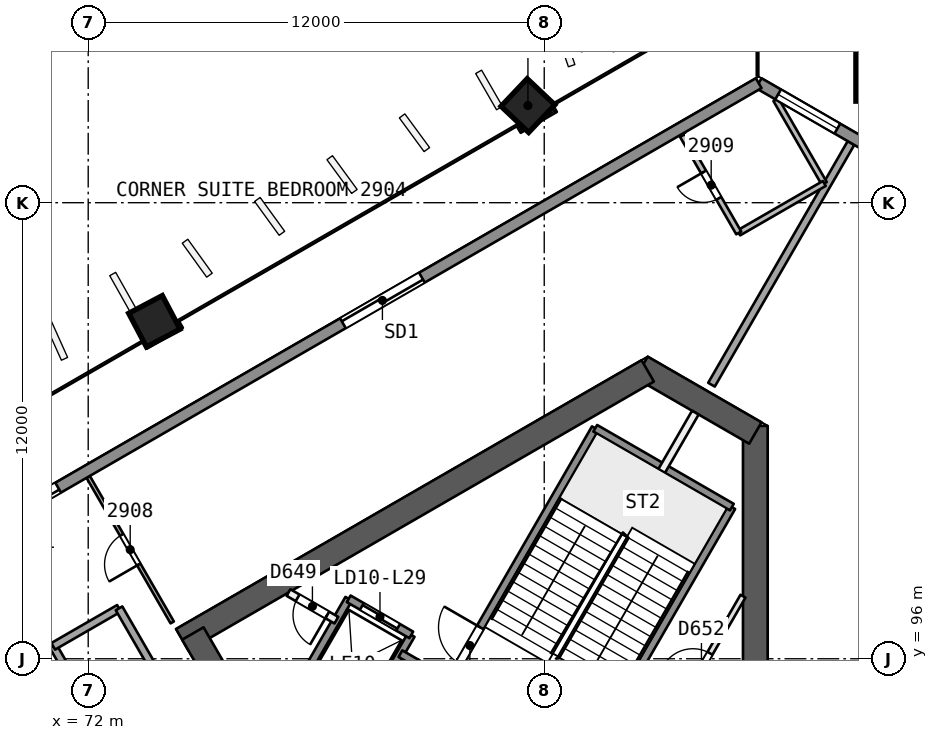
"""IFC4 building model, lengths in metres.
Left out: names, types, materials, properties, quantities, classifications, styles, units other than length and angle.
Written with IfcOpenShell. Run it as: python <this file> out.ifc"""

import sys

from ifc_helpers import new_model, si_unit, direction, frame, frame_2d, origin, origin_2d, place, context, subcontext, project, spatial, rectangle, extrude, element, fill, save


model = new_model("IFC4")
c1 = context("Model", 3, precision=1e-05, world=origin(), true_north=direction((0.0, 1.0)))
c2 = subcontext(c1, "Body", "Model", "MODEL_VIEW")
j1 = project(units=[si_unit("LENGTHUNIT", "METRE"), si_unit("PLANEANGLEUNIT", "RADIAN")], contexts=[c1])
p1 = place(None, origin())
s1 = spatial("IfcSite", under=j1, at=p1, CompositionType="ELEMENT")
p2 = place(p1, origin())
s2 = spatial("IfcBuilding", under=s1, at=p2, CompositionType="ELEMENT")
p3 = place(p2, frame((0.0, 0.0, 121.6)))
s3 = spatial("IfcBuildingStorey", under=s2, at=p3, CompositionType="ELEMENT", Elevation=121.6)
p4 = place(p3, frame((89.555, 88.119, 0.0), z_axis=(0.0, 0.0, 1.0), x_axis=(0.0, 1.0, 0.0)))
e1 = element("IfcWall", 1, at=p4, inside=s3, PredefinedType="SHEAR", context=c2, shape_type="SweptSolid", body=[
    extrude(rectangle(XDim=14.009, YDim=0.65, at=frame_2d((7.004, 0.0))), origin(), (0.0, 0.0, 1.0), 3.7),
])
p5 = place(p3, frame((89.555, 101.94, 0.0), z_axis=(0.0, 0.0, 1.0), x_axis=(-0.866031550877, 0.499989352773, 0.0)))
e2 = element("IfcWall", 2, at=p5, inside=s3, PredefinedType="SHEAR", context=c2, shape_type="SweptSolid", body=[
    extrude(rectangle(XDim=3.458, YDim=0.65, at=frame_2d((1.729, 0.0))), origin(), (0.0, 0.0, 1.0), 3.7),
])
p6 = place(p3, frame((86.723, 103.575, 0.0), z_axis=(0.0, 0.0, 1.0), x_axis=(-0.866031824457, -0.499988878904, 0.0)))
e3 = element("IfcWall", 3, at=p6, inside=s3, PredefinedType="SHEAR", context=c2, shape_type="SweptSolid", body=[
    extrude(rectangle(XDim=14.146, YDim=0.65, at=frame_2d((7.073, 0.0))), origin(), (0.0, 0.0, 1.0), 3.7),
])
p7 = place(p3, frame((74.754, 96.665, 0.0), z_axis=(0.0, 0.0, 1.0), x_axis=(0.500011799426, -0.866018591275, 0.0)))
e4 = element("IfcWall", 4, at=p7, inside=s3, PredefinedType="SHEAR", context=c2, shape_type="SweptSolid", body=[
    extrude(rectangle(XDim=10.055, YDim=0.65, at=frame_2d((5.027, 0.0))), origin(), (0.0, 0.0, 1.0), 3.7),
])
p8 = place(p7, frame((7.905, 0.0, 0.0)))
e5 = element("IfcOpeningElement", 5, at=p8, cuts=e4, PredefinedType="OPENING", context=c2, shape_type="SweptSolid", body=[
    extrude(rectangle(XDim=1.2, YDim=2.1, at=frame_2d((0.6, 1.05))), frame((0.0, 0.335, 0.0), z_axis=(0.0, -1.0, 0.0), x_axis=(1.0, 0.0, 0.0)), (0.0, 0.0, 1.0), 0.671),
])
p9 = place(p3, frame((93.422, 111.908, 0.0), z_axis=(-0.017607001884, -0.030531992032, 0.999378702468), x_axis=(0.499253360369, 0.865738917404, 0.035244986208)))
e6 = element("IfcColumn", 6, at=p9, inside=s3, PredefinedType="COLUMN", context=c2, shape_type="SweptSolid", body=[
    extrude(rectangle(XDim=2.4, YDim=2.4, at=origin_2d()), origin(), (0.0, 0.0, 1.0), 3.702),
])
p10 = place(p3, frame((83.581, 110.59, 0.0), z_axis=(-0.008376454378, -0.028163354484, 0.999568237028), x_axis=(0.865847772055, 0.49985224108, 0.021339463807)))
e7 = element("IfcColumn", 7, at=p10, inside=s3, PredefinedType="COLUMN", context=c2, shape_type="SweptSolid", body=[
    extrude(rectangle(XDim=1.0, YDim=1.0, at=origin_2d()), origin(), (0.0, 0.0, 1.0), 3.702),
])
p11 = place(p3, frame((73.74, 104.908, 0.0), z_axis=(0.000857578916, -0.022824792675, 0.999739112668), x_axis=(0.866060219769, 0.499825848733, 0.01066848966)))
e8 = element("IfcColumn", 8, at=p11, inside=s3, PredefinedType="COLUMN", context=c2, shape_type="SweptSolid", body=[
    extrude(rectangle(XDim=1.0, YDim=1.0, at=origin_2d()), origin(), (0.0, 0.0, 1.0), 3.701),
])
p12 = place(p3, frame((92.073, 109.571, 0.0), z_axis=(0.0, 0.0, 1.0), x_axis=(-0.49997955719, -0.866037206124, 0.0)))
e9 = element("IfcWall", 9, at=p12, inside=s3, PredefinedType="PARTITIONING", context=c2, shape_type="SweptSolid", body=[
    extrude(rectangle(XDim=7.343, YDim=0.2, at=frame_2d((3.671, 0.0))), origin(), (0.0, 0.0, 1.0), 3.25),
])
p13 = place(p3, frame((74.21, 96.956, 0.0), z_axis=(0.0, 0.0, 1.0), x_axis=(-0.499956595832, 0.866050461743, 0.0)))
e10 = element("IfcWall", 10, at=p13, inside=s3, PredefinedType="PARTITIONING", context=c2, shape_type="SweptSolid", body=[
    extrude(rectangle(XDim=4.423, YDim=0.1, at=frame_2d((2.211, 0.0))), origin(), (0.0, 0.0, 1.0), 3.25),
])
p14 = place(p13, frame((1.761, 0.0, 0.0)))
e11 = element("IfcOpeningElement", 11, at=p14, cuts=e10, PredefinedType="OPENING", context=c2, shape_type="SweptSolid", body=[
    extrude(rectangle(XDim=0.9, YDim=2.1, at=frame_2d((0.45, 1.05))), frame((0.0, 0.061, 0.0), z_axis=(0.0, -1.0, 0.0), x_axis=(1.0, 0.0, 0.0)), (0.0, 0.0, 1.0), 0.121),
])
p15 = place(p3, frame((75.579, 88.533, 0.0), z_axis=(0.0, 0.0, 1.0), x_axis=(-0.5000018851, 0.866024315419, 0.0)))
e12 = element("IfcWall", 12, at=p15, inside=s3, PredefinedType="PARTITIONING", context=c2, shape_type="SweptSolid", body=[
    extrude(rectangle(XDim=9.0, YDim=0.2, at=frame_2d((4.5, 0.0))), origin(), (0.0, 0.0, 1.0), 3.25),
])
p16 = place(p15, frame((2.1, 0.0, 0.0)))
e13 = element("IfcOpeningElement", 13, at=p16, cuts=e12, PredefinedType="OPENING", context=c2, shape_type="SweptSolid", body=[
    extrude(rectangle(XDim=0.9, YDim=2.1, at=frame_2d((0.45, 1.05))), frame((0.0, 0.11, 0.0), z_axis=(0.0, -1.0, 0.0), x_axis=(1.0, 0.0, 0.0)), (0.0, 0.0, 1.0), 0.221),
])
p17 = place(p3, frame((71.079, 96.327, 0.0), z_axis=(0.0, 0.0, 1.0), x_axis=(0.866041268327, 0.499972520799, 0.0)))
e14 = element("IfcWall", 14, at=p17, inside=s3, PredefinedType="PARTITIONING", context=c2, shape_type="SweptSolid", body=[
    extrude(rectangle(XDim=2.0, YDim=0.2, at=frame_2d((1.0, 0.0))), origin(), (0.0, 0.0, 1.0), 3.25),
])
p18 = place(p3, frame((72.811, 97.327, 0.0), z_axis=(0.0, 0.0, 1.0), x_axis=(0.5000018851, -0.866024315419, 0.0)))
e15 = element("IfcWall", 15, at=p18, inside=s3, PredefinedType="PARTITIONING", context=c2, shape_type="SweptSolid", body=[
    extrude(rectangle(XDim=9.0, YDim=0.2, at=frame_2d((4.5, 0.0))), origin(), (0.0, 0.0, 1.0), 3.25),
])
p19 = place(p3, frame((68.489, 98.76, 0.0), z_axis=(0.0, 0.0, 1.0), x_axis=(0.499987701298, -0.866032504327, 0.0)))
e16 = element("IfcWall", 16, at=p19, inside=s3, PredefinedType="PARTITIONING", context=c2, shape_type="SweptSolid", body=[
    extrude(rectangle(XDim=9.402, YDim=0.2, at=frame_2d((4.701, 0.0))), origin(), (0.0, 0.0, 1.0), 3.25),
])
p20 = place(p3, frame((90.096, 110.712, 0.0), z_axis=(0.0, 0.0, 1.0), x_axis=(0.499963028251, -0.866046748381, 0.0)))
e17 = element("IfcWall", 17, at=p20, inside=s3, PredefinedType="PARTITIONING", context=c2, shape_type="SweptSolid", body=[
    extrude(rectangle(XDim=2.548, YDim=0.15, at=frame_2d((1.274, 0.0))), origin(), (0.0, 0.0, 1.0), 3.25),
])
p21 = place(p3, frame((91.37, 108.505, 0.0), z_axis=(0.0, 0.0, 1.0), x_axis=(-0.866062058628, -0.499936506574, 0.0)))
e18 = element("IfcWall", 18, at=p21, inside=s3, PredefinedType="PARTITIONING", context=c2, shape_type="SweptSolid", body=[
    extrude(rectangle(XDim=2.6, YDim=0.15, at=frame_2d((1.3, 0.0))), origin(), (0.0, 0.0, 1.0), 3.25),
])
p22 = place(p3, frame((89.118, 107.206, 0.0), z_axis=(0.0, 0.0, 1.0), x_axis=(-0.500008142102, 0.866020702889, 0.0)))
e19 = element("IfcWall", 19, at=p22, inside=s3, PredefinedType="PARTITIONING", context=c2, shape_type="SweptSolid", body=[
    extrude(rectangle(XDim=2.959, YDim=0.15, at=frame_2d((1.479, 0.0))), origin(), (0.0, 0.0, 1.0), 3.25),
])
p23 = place(p22, frame((1.05, 0.0, 0.0)))
e20 = element("IfcOpeningElement", 20, at=p23, cuts=e19, PredefinedType="OPENING", context=c2, shape_type="SweptSolid", body=[
    extrude(rectangle(XDim=0.8, YDim=2.1, at=frame_2d((0.4, 1.05))), frame((0.0, 0.085, 0.0), z_axis=(0.0, -1.0, 0.0), x_axis=(1.0, 0.0, 0.0)), (0.0, 0.0, 1.0), 0.171),
])
p24 = place(p3, frame((89.643, 111.145, 0.0), z_axis=(0.0, 0.0, 1.0), x_axis=(0.866033704959, -0.499985621668, 0.0)))
e21 = element("IfcWall", 21, at=p24, inside=s3, PredefinedType="SOLIDWALL", context=c2, shape_type="SweptSolid", body=[
    extrude(rectangle(XDim=5.782, YDim=0.3, at=frame_2d((2.891, 0.0))), origin(), (0.0, 0.0, 1.0), 3.25),
])
p25 = place(p24, frame((0.59, 0.0, 0.9)))
e22 = element("IfcOpeningElement", 22, at=p25, cuts=e21, PredefinedType="OPENING", context=c2, shape_type="SweptSolid", body=[
    extrude(rectangle(XDim=1.8, YDim=1.5, at=frame_2d((0.9, 0.75))), frame((0.0, 0.161, 0.0), z_axis=(0.0, -1.0, 0.0), x_axis=(1.0, 0.0, 0.0)), (0.0, 0.0, 1.0), 0.321),
])
p26 = place(p24, frame((3.479, 0.0, 0.9)))
e23 = element("IfcOpeningElement", 23, at=p26, cuts=e21, PredefinedType="OPENING", context=c2, shape_type="SweptSolid", body=[
    extrude(rectangle(XDim=1.8, YDim=1.5, at=frame_2d((0.9, 0.75))), frame((0.0, 0.161, 0.0), z_axis=(0.0, -1.0, 0.0), x_axis=(1.0, 0.0, 0.0)), (0.0, 0.0, 1.0), 0.321),
])
p27 = place(p3, frame((40.706, 82.891, 0.0), z_axis=(0.0, 0.0, 1.0), x_axis=(0.866024855185, 0.5000009502, 0.0)))
e24 = element("IfcWall", 24, at=p27, inside=s3, PredefinedType="SOLIDWALL", context=c2, shape_type="SweptSolid", body=[
    extrude(rectangle(XDim=56.508, YDim=0.3, at=frame_2d((28.254, 0.0))), origin(), (0.0, 0.0, 1.0), 3.25),
])
p28 = place(p27, frame((27.054, 0.0, 0.0)))
e25 = element("IfcOpeningElement", 25, at=p28, cuts=e24, PredefinedType="OPENING", context=c2, shape_type="SweptSolid", body=[
    extrude(rectangle(XDim=2.4, YDim=2.4, at=frame_2d((1.2, 1.2))), frame((0.0, 0.161, 0.0), z_axis=(0.0, -1.0, 0.0), x_axis=(1.0, 0.0, 0.0)), (0.0, 0.0, 1.0), 0.321),
])
p29 = place(p27, frame((32.822, 0.0, 0.0)))
e26 = element("IfcOpeningElement", 26, at=p29, cuts=e24, PredefinedType="OPENING", context=c2, shape_type="SweptSolid", body=[
    extrude(rectangle(XDim=2.4, YDim=2.4, at=frame_2d((1.2, 1.2))), frame((0.0, 0.161, 0.0), z_axis=(0.0, -1.0, 0.0), x_axis=(1.0, 0.0, 0.0)), (0.0, 0.0, 1.0), 0.321),
])
p30 = place(p27, frame((43.875, 0.0, 0.0)))
e27 = element("IfcOpeningElement", 27, at=p30, cuts=e24, PredefinedType="OPENING", context=c2, shape_type="SweptSolid", body=[
    extrude(rectangle(XDim=2.4, YDim=2.4, at=frame_2d((1.2, 1.2))), frame((0.0, 0.161, 0.0), z_axis=(0.0, -1.0, 0.0), x_axis=(1.0, 0.0, 0.0)), (0.0, 0.0, 1.0), 0.321),
])
p31 = place(p27, frame((21.286, 0.0, 0.0)))
e28 = element("IfcOpeningElement", 28, at=p31, cuts=e24, PredefinedType="OPENING", context=c2, shape_type="SweptSolid", body=[
    extrude(rectangle(XDim=2.4, YDim=2.4, at=frame_2d((1.2, 1.2))), frame((0.0, 0.161, 0.0), z_axis=(0.0, -1.0, 0.0), x_axis=(1.0, 0.0, 0.0)), (0.0, 0.0, 1.0), 0.321),
])
p32 = place(p27, frame((10.251, 0.0, 0.0)))
e29 = element("IfcOpeningElement", 29, at=p32, cuts=e24, PredefinedType="OPENING", context=c2, shape_type="SweptSolid", body=[
    extrude(rectangle(XDim=2.4, YDim=2.4, at=frame_2d((1.2, 1.2))), frame((0.0, 0.161, 0.0), z_axis=(0.0, -1.0, 0.0), x_axis=(1.0, 0.0, 0.0)), (0.0, 0.0, 1.0), 0.321),
])
p33 = place(p3, frame((87.071, 93.908, 0.0), z_axis=(0.0, 0.0, 1.0), x_axis=(0.500012861172, 0.866017978256, 0.0)))
e30 = element("IfcWall", 30, at=p33, inside=s3, PredefinedType="PARTITIONING", context=c2, shape_type="SweptSolid", body=[
    extrude(rectangle(XDim=4.318, YDim=0.15, at=frame_2d((2.159, 0.0))), origin(), (0.0, 0.0, 1.0), 3.25),
])
p34 = place(p33, frame((1.681, 0.0, 0.0)))
e31 = element("IfcOpeningElement", 31, at=p34, cuts=e30, PredefinedType="OPENING", context=c2, shape_type="SweptSolid", body=[
    extrude(rectangle(XDim=0.9, YDim=2.1, at=frame_2d((0.45, 1.05))), frame((0.0, 0.085, 0.0), z_axis=(0.0, -1.0, 0.0), x_axis=(1.0, 0.0, 0.0)), (0.0, 0.0, 1.0), 0.171),
])
p35 = place(p3, frame((85.087, 93.321, 0.0), z_axis=(0.0, 0.0, 1.0), x_axis=(0.500019787375, 0.866013979237, 0.0)))
e32 = element("IfcWall", 32, at=p35, inside=s3, PredefinedType="SOLIDWALL", context=c2, shape_type="SweptSolid", body=[
    extrude(rectangle(XDim=7.7, YDim=0.2, at=frame_2d((3.85, 0.0))), origin(), (0.0, 0.0, 1.0), 3.25),
])
p36 = place(p3, frame((87.09, 100.94, 0.0), z_axis=(0.0, 0.0, 1.0), x_axis=(0.499944938281, 0.866057191349, 0.0)))
e33 = element("IfcWall", 33, at=p36, inside=s3, PredefinedType="PARTITIONING", context=c2, shape_type="SweptSolid", body=[
    extrude(rectangle(XDim=1.773, YDim=0.2, at=frame_2d((0.887, 0.0))), origin(), (0.0, 0.0, 1.0), 3.25),
])
p37 = place(p3, frame((81.493, 95.396, 0.0), z_axis=(0.0, 0.0, 1.0), x_axis=(0.500006057782, 0.866021906294, 0.0)))
e34 = element("IfcWall", 34, at=p37, inside=s3, PredefinedType="SOLIDWALL", context=c2, shape_type="SweptSolid", body=[
    extrude(rectangle(XDim=7.7, YDim=0.2, at=frame_2d((3.85, 0.0))), origin(), (0.0, 0.0, 1.0), 3.25),
])
p38 = place(p37, frame((0.55, 0.0, 0.0)))
e35 = element("IfcOpeningElement", 35, at=p38, cuts=e34, PredefinedType="OPENING", context=c2, shape_type="SweptSolid", body=[
    extrude(rectangle(XDim=1.1, YDim=2.1, at=frame_2d((0.55, 1.05))), frame((0.0, 0.11, 0.0), z_axis=(0.0, -1.0, 0.0), x_axis=(1.0, 0.0, 0.0)), (0.0, 0.0, 1.0), 0.221),
])
for number, where, z_axis, x_axis in (
    (36, (78.976, 93.986, 0.0), (0.0, 0.0, 1.0), (0.5, 0.866, 0.0)),
    (37, (77.33, 94.936, 0.0), (0.0, 0.0, 1.0), (0.5, 0.866, 0.0)),
):
    element("IfcWall", number, at=place(p3, frame(where, z_axis=z_axis, x_axis=x_axis)), inside=s3, PredefinedType="SOLIDWALL", context=c2, shape_type="SweptSolid", body=[
        extrude(rectangle(XDim=3.05, YDim=0.2, at=frame_2d((1.525, 0.0))), origin(), (0.0, 0.0, 1.0), 3.25),
    ])
p39 = place(p3, frame((78.53, 97.014, 0.0), z_axis=(0.0, 0.0, 1.0), x_axis=(-0.866045896294, 0.499964504253, 0.0)))
e38 = element("IfcWall", 38, at=p39, inside=s3, PredefinedType="PARTITIONING", context=c2, shape_type="SweptSolid", body=[
    extrude(rectangle(XDim=1.455, YDim=0.2, at=frame_2d((0.728, 0.0))), origin(), (0.0, 0.0, 1.0), 3.25),
])
p40 = place(p39, frame((0.278, 0.0, 0.0)))
e39 = element("IfcOpeningElement", 39, at=p40, cuts=e38, PredefinedType="OPENING", context=c2, shape_type="SweptSolid", body=[
    extrude(rectangle(XDim=0.9, YDim=2.1, at=frame_2d((0.45, 1.05))), frame((0.0, 0.11, 0.0), z_axis=(0.0, -1.0, 0.0), x_axis=(1.0, 0.0, 0.0)), (0.0, 0.0, 1.0), 0.221),
])
p41 = place(p3, frame((88.01, 91.634, 0.0), z_axis=(0.0, 0.0, 1.0), x_axis=(-0.866024315419, 0.5000018851, 0.0)))
e40 = element("IfcWall", 40, at=p41, inside=s3, PredefinedType="SOLIDWALL", context=c2, shape_type="SweptSolid", body=[
    extrude(rectangle(XDim=9.0, YDim=0.2, at=frame_2d((4.5, 0.0))), origin(), (0.0, 0.0, 1.0), 3.25),
])
p42 = place(p3, frame((80.5, 96.627, 0.0), z_axis=(0.0, 0.0, 1.0), x_axis=(-0.86601224135, 0.500022797313, 0.0)))
e41 = element("IfcWall", 41, at=p42, inside=s3, PredefinedType="SOLIDWALL", context=c2, shape_type="SweptSolid", body=[
    extrude(rectangle(XDim=1.9, YDim=0.2, at=frame_2d((0.95, 0.0))), origin(), (0.0, 0.0, 1.0), 3.25),
])
p43 = place(p42, frame((0.4, 0.0, 0.0)))
e42 = element("IfcOpeningElement", 42, at=p43, cuts=e41, PredefinedType="OPENING", context=c2, shape_type="SweptSolid", body=[
    extrude(rectangle(XDim=1.1, YDim=2.1, at=frame_2d((0.55, 1.05))), frame((0.0, 0.11, 0.0), z_axis=(0.0, -1.0, 0.0), x_axis=(1.0, 0.0, 0.0)), (0.0, 0.0, 1.0), 0.221),
])
p44 = place(p3, frame((88.937, 99.99, 0.0), z_axis=(0.0, 0.0, 1.0), x_axis=(-0.866004344652, 0.500036473714, 0.0)))
e43 = element("IfcWall", 43, at=p44, inside=s3, PredefinedType="SOLIDWALL", context=c2, shape_type="SweptSolid", body=[
    extrude(rectangle(XDim=4.15, YDim=0.2, at=frame_2d((2.075, 0.0))), origin(), (0.0, 0.0, 1.0), 3.25),
])
p45 = place(p14, origin())
e44 = element("IfcDoor", 44, at=p45, inside=s3, OperationType="SINGLE_SWING_LEFT", PredefinedType="NOTDEFINED", context=c2, shape_type="SweptSolid", body=[
    extrude(rectangle(XDim=0.9, YDim=2.1, at=frame_2d((0.45, 1.05))), frame((0.0, 0.025, 0.0), z_axis=(0.0, -1.0, 0.0), x_axis=(1.0, 0.0, 0.0)), (0.0, 0.0, 1.0), 0.05),
])
fill(e11, e44)
p46 = place(p23, origin())
e45 = element("IfcDoor", 45, at=p46, inside=s3, OperationType="SINGLE_SWING_RIGHT", PredefinedType="NOTDEFINED", context=c2, shape_type="SweptSolid", body=[
    extrude(rectangle(XDim=0.8, YDim=2.1, at=frame_2d((0.4, 1.05))), frame((0.0, 0.025, 0.0), z_axis=(0.0, -1.0, 0.0), x_axis=(1.0, 0.0, 0.0)), (0.0, 0.0, 1.0), 0.05),
])
fill(e20, e45)
p47 = place(p25, origin())
e46 = element("IfcWindow", 46, at=p47, inside=s3, PartitioningType="SINGLE_PANEL", PredefinedType="WINDOW", context=c2, shape_type="SweptSolid", body=[
    extrude(rectangle(XDim=1.8, YDim=1.5, at=frame_2d((0.9, 0.75))), frame((0.0, 0.03, 0.0), z_axis=(0.0, -1.0, 0.0), x_axis=(1.0, 0.0, 0.0)), (0.0, 0.0, 1.0), 0.06),
])
fill(e22, e46)
p48 = place(p29, origin())
e47 = element("IfcDoor", 47, at=p48, inside=s3, OperationType="SLIDING_TO_RIGHT", PredefinedType="NOTDEFINED", context=c2, shape_type="SweptSolid", body=[
    extrude(rectangle(XDim=2.4, YDim=2.4, at=frame_2d((1.2, 1.2))), frame((0.0, 0.025, 0.0), z_axis=(0.0, -1.0, 0.0), x_axis=(1.0, 0.0, 0.0)), (0.0, 0.0, 1.0), 0.05),
])
fill(e26, e47)
p49 = place(p30, origin())
e48 = element("IfcDoor", 48, at=p49, inside=s3, OperationType="SLIDING_TO_LEFT", PredefinedType="NOTDEFINED", context=c2, shape_type="SweptSolid", body=[
    extrude(rectangle(XDim=2.4, YDim=2.4, at=frame_2d((1.2, 1.2))), frame((0.0, 0.025, 0.0), z_axis=(0.0, -1.0, 0.0), x_axis=(1.0, 0.0, 0.0)), (0.0, 0.0, 1.0), 0.05),
])
fill(e27, e48)
p50 = place(p43, origin())
e49 = element("IfcDoor", 49, at=p50, inside=s3, OperationType="SLIDING_TO_RIGHT", PredefinedType="NOTDEFINED", context=c2, shape_type="SweptSolid", body=[
    extrude(rectangle(XDim=1.1, YDim=2.1, at=frame_2d((0.55, 1.05))), frame((0.0, 0.025, 0.0), z_axis=(0.0, -1.0, 0.0), x_axis=(1.0, 0.0, 0.0)), (0.0, 0.0, 1.0), 0.05),
])
fill(e42, e49)
p51 = place(p40, origin())
e50 = element("IfcDoor", 50, at=p51, inside=s3, OperationType="SINGLE_SWING_LEFT", PredefinedType="NOTDEFINED", context=c2, shape_type="SweptSolid", body=[
    extrude(rectangle(XDim=0.9, YDim=2.1, at=frame_2d((0.45, 1.05))), frame((0.0, 0.025, 0.0), z_axis=(0.0, -1.0, 0.0), x_axis=(1.0, 0.0, 0.0)), (0.0, 0.0, 1.0), 0.05),
])
fill(e39, e50)
p52 = place(p38, origin())
e51 = element("IfcDoor", 51, at=p52, inside=s3, OperationType="SINGLE_SWING_RIGHT", PredefinedType="NOTDEFINED", context=c2, shape_type="SweptSolid", body=[
    extrude(rectangle(XDim=1.1, YDim=2.1, at=frame_2d((0.55, 1.05))), frame((0.0, 0.025, 0.0), z_axis=(0.0, -1.0, 0.0), x_axis=(1.0, 0.0, 0.0)), (0.0, 0.0, 1.0), 0.05),
])
fill(e35, e51)
p53 = place(p34, origin())
e52 = element("IfcDoor", 52, at=p53, inside=s3, OperationType="SINGLE_SWING_LEFT", PredefinedType="NOTDEFINED", context=c2, shape_type="SweptSolid", body=[
    extrude(rectangle(XDim=0.9, YDim=2.1, at=frame_2d((0.45, 1.05))), frame((0.0, 0.025, 0.0), z_axis=(0.0, -1.0, 0.0), x_axis=(1.0, 0.0, 0.0)), (0.0, 0.0, 1.0), 0.05),
])
fill(e31, e52)
save(model, sys.argv[1])
